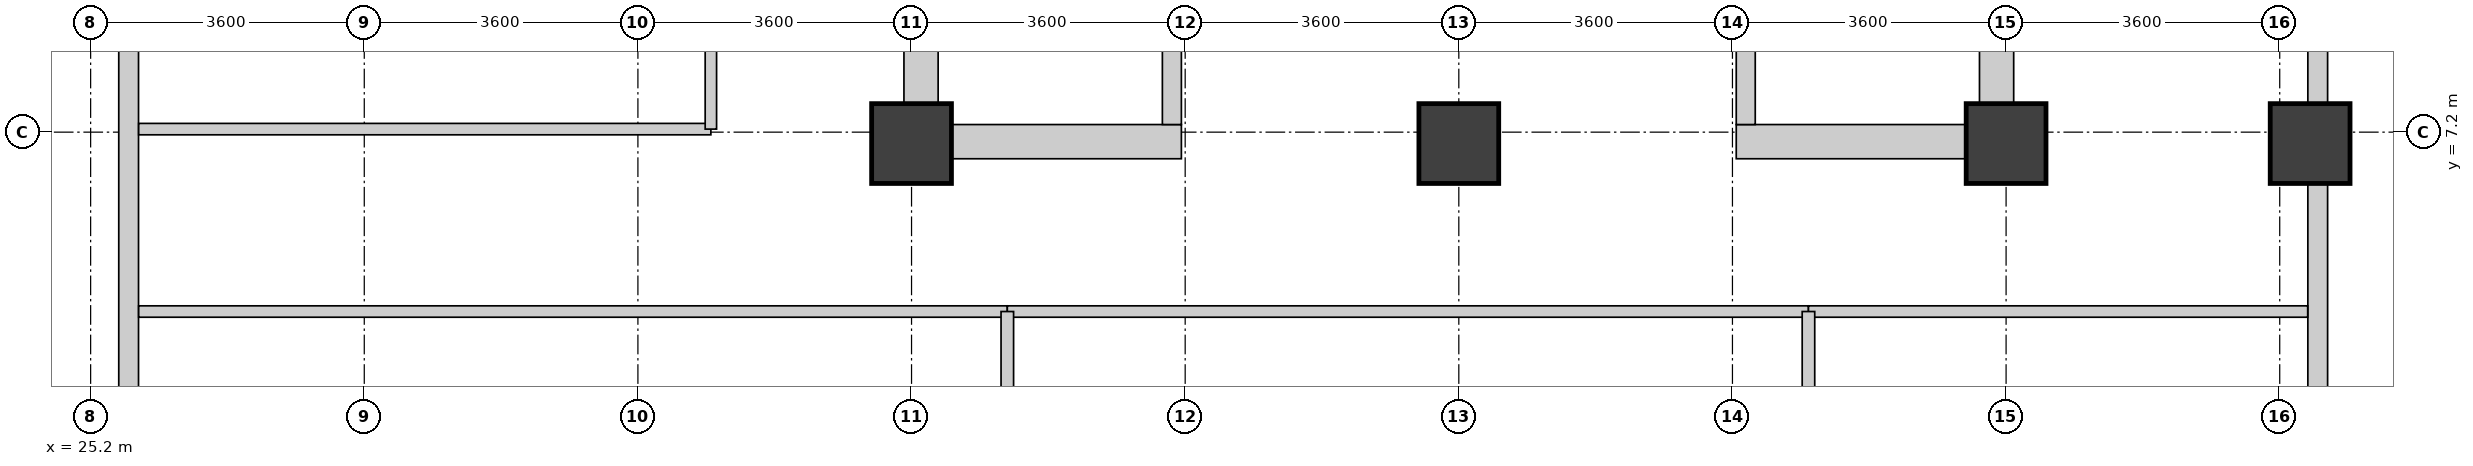
"""IFC4 building model, lengths in metres.
Left out: names, types, materials, properties, quantities, classifications, styles, units other than length and angle.
Written with IfcOpenShell. Run it as: python <this file> out.ifc"""

import sys

from ifc_helpers import new_model, si_unit, direction, frame, frame_2d, origin, origin_2d, place, context, subcontext, project, spatial, rectangle, extrude, source, transform, mapped, element, fill, save


model = new_model("IFC4")
c1 = context("Model", 3, precision=1e-05, world=origin(), true_north=direction((0.0, 1.0)))
c2 = subcontext(c1, "Body", "Model", "MODEL_VIEW")
j1 = project(units=[si_unit("LENGTHUNIT", "METRE"), si_unit("PLANEANGLEUNIT", "RADIAN")], contexts=[c1])
p1 = place(None, origin())
s1 = spatial("IfcSite", under=j1, at=p1, CompositionType="ELEMENT")
p2 = place(p1, origin())
s2 = spatial("IfcBuilding", under=s1, at=p2, CompositionType="ELEMENT")
p3 = place(p2, frame((0.0, 0.0, 135.6)))
s3 = spatial("IfcBuildingStorey", under=s2, at=p3, CompositionType="ELEMENT", Elevation=135.6)
for number, where, z_axis, x_axis in (
    (1, (36.125, 6.85, 0.0), (0.0, 0.0, 1.0), (0.0, 1.0, 0.0)),
    (2, (50.275, 6.85, 0.0), (0.0, 0.0, 1.0), (0.0, 1.0, 0.0)),
):
    element("IfcWall", number, at=place(p3, frame(where, z_axis=z_axis, x_axis=x_axis)), inside=s3, PredefinedType="SHEAR", context=c2, shape_type="SweptSolid", body=[
        extrude(rectangle(XDim=7.9, YDim=0.45, at=frame_2d((3.95, 0.0))), origin(), (0.0, 0.0, 1.0), 4.36),
    ])
for number, where, z_axis, x_axis in (
    (3, (36.35, 7.075, 0.0), (0.0, 0.0, 1.0), (1.0, 0.0, 0.0)),
    (4, (46.85, 7.075, 0.0), (0.0, 0.0, 1.0), (1.0, 0.0, 0.0)),
):
    element("IfcWall", number, at=place(p3, frame(where, z_axis=z_axis, x_axis=x_axis)), inside=s3, PredefinedType="SHEAR", context=c2, shape_type="SweptSolid", body=[
        extrude(rectangle(XDim=3.2, YDim=0.45, at=frame_2d((1.6, 0.0))), origin(), (0.0, 0.0, 1.0), 4.36),
    ])
p4 = place(p3, frame((39.425, 7.3, 0.0), z_axis=(0.0, 0.0, 1.0), x_axis=(0.0, 1.0, 0.0)))
e5 = element("IfcWall", 5, at=p4, inside=s3, PredefinedType="SHEAR", context=c2, shape_type="SweptSolid", body=[
    extrude(rectangle(XDim=7.0, YDim=0.25, at=frame_2d((3.5, 0.0))), origin(), (0.0, 0.0, 1.0), 4.36),
])
p5 = place(p4, frame((0.15, 0.0, 0.0)))
e6 = element("IfcOpeningElement", 6, at=p5, cuts=e5, PredefinedType="OPENING", context=c2, shape_type="SweptSolid", body=[
    extrude(rectangle(XDim=1.1, YDim=2.08, at=frame_2d((0.55, 1.04))), frame((0.0, 0.135, 0.0), z_axis=(0.0, -1.0, 0.0), x_axis=(1.0, 0.0, 0.0)), (0.0, 0.0, 1.0), 0.27),
])
p6 = place(p3, frame((46.975, 7.3, 0.0), z_axis=(0.0, 0.0, 1.0), x_axis=(0.0, 1.0, 0.0)))
e7 = element("IfcWall", 7, at=p6, inside=s3, PredefinedType="SHEAR", context=c2, shape_type="SweptSolid", body=[
    extrude(rectangle(XDim=7.0, YDim=0.25, at=frame_2d((3.5, 0.0))), origin(), (0.0, 0.0, 1.0), 4.36),
])
p7 = place(p6, frame((0.15, 0.0, 0.0)))
e8 = element("IfcOpeningElement", 8, at=p7, cuts=e7, PredefinedType="OPENING", context=c2, shape_type="SweptSolid", body=[
    extrude(rectangle(XDim=1.1, YDim=2.08, at=frame_2d((0.55, 1.04))), frame((0.0, 0.135, 0.0), z_axis=(0.0, -1.0, 0.0), x_axis=(1.0, 0.0, 0.0)), (0.0, 0.0, 1.0), 0.27),
])
m1 = source(origin(), c2, "Body", "SweptSolid", [
    extrude(rectangle(XDim=1.05, YDim=1.05, at=origin_2d()), origin(), (0.0, 0.0, 1.0), 4.6),
])
for number, where, z_axis, x_axis in (
    (9, (36.0, 7.05, 0.0), (0.0, 0.0, 1.0), (1.0, 0.0, 0.0)),
    (10, (43.2, 7.05, 0.0), (0.0, 0.0, 1.0), (1.0, 0.0, 0.0)),
    (11, (50.4, 7.05, 0.0), (0.0, 0.0, 1.0), (1.0, 0.0, 0.0)),
    (12, (54.4, 7.05, 0.0), (0.0, 0.0, 1.0), (1.0, 0.0, 0.0)),
):
    element("IfcColumn", number, at=place(p3, frame(where, z_axis=z_axis, x_axis=x_axis)), inside=s3, PredefinedType="COLUMN", context=c2, shape_type="MappedRepresentation", body=[
        mapped(m1, transform((0.0, 0.0, 0.0), x_axis=(1.0, 0.0, 0.0), y_axis=(0.0, 1.0, 0.0), z_axis=(0.0, 0.0, 1.0), scale=1.0)),
    ])
p8 = place(p3, frame((54.5, 6.524, 0.0), z_axis=(0.0, 0.0, 1.0), x_axis=(0.0, -1.0, 0.0)))
e13 = element("IfcWall", 13, at=p8, inside=s3, PredefinedType="STANDARD", context=c2, shape_type="SweptSolid", body=[
    extrude(rectangle(XDim=4.854, YDim=0.26, at=frame_2d((2.427, 0.0))), origin(), (0.0, 0.0, 1.0), 4.34),
])
p9 = place(p8, frame((1.952, 0.0, 0.85)))
e14 = element("IfcOpeningElement", 14, at=p9, cuts=e13, PredefinedType="OPENING", context=c2, shape_type="SweptSolid", body=[
    extrude(rectangle(XDim=0.95, YDim=1.75, at=frame_2d((0.475, 0.875))), frame((0.0, 0.14, 0.0), z_axis=(0.0, -1.0, 0.0), x_axis=(1.0, 0.0, 0.0)), (0.0, 0.0, 1.0), 0.28),
])
p10 = place(p3, frame((54.5, 14.024, 0.0), z_axis=(0.0, 0.0, 1.0), x_axis=(0.0, -1.0, 0.0)))
e15 = element("IfcWall", 15, at=p10, inside=s3, PredefinedType="STANDARD", context=c2, shape_type="SweptSolid", body=[
    extrude(rectangle(XDim=6.448, YDim=0.26, at=frame_2d((3.224, 0.0))), origin(), (0.0, 0.0, 1.0), 3.89),
])
p11 = place(p10, frame((2.749, 0.0, 0.85)))
e16 = element("IfcOpeningElement", 16, at=p11, cuts=e15, PredefinedType="OPENING", context=c2, shape_type="SweptSolid", body=[
    extrude(rectangle(XDim=0.95, YDim=1.75, at=frame_2d((0.475, 0.875))), frame((0.0, 0.14, 0.0), z_axis=(0.0, -1.0, 0.0), x_axis=(1.0, 0.0, 0.0)), (0.0, 0.0, 1.0), 0.28),
])
p12 = place(p10, frame((1.15, 0.0, 0.85)))
e17 = element("IfcOpeningElement", 17, at=p12, cuts=e15, PredefinedType="OPENING", context=c2, shape_type="SweptSolid", body=[
    extrude(rectangle(XDim=0.95, YDim=1.75, at=frame_2d((0.475, 0.875))), frame((0.0, 0.14, 0.0), z_axis=(0.0, -1.0, 0.0), x_axis=(1.0, 0.0, 0.0)), (0.0, 0.0, 1.0), 0.28),
])
p13 = place(p3, frame((25.7, 1.67, 0.0), z_axis=(0.0, 0.0, 1.0), x_axis=(0.0, 1.0, 0.0)))
e18 = element("IfcWall", 18, at=p13, inside=s3, PredefinedType="STANDARD", context=c2, shape_type="SweptSolid", body=[
    extrude(rectangle(XDim=20.06, YDim=0.26, at=frame_2d((10.03, 0.0))), origin(), (0.0, 0.0, 1.0), 4.34),
])
p14 = place(p13, frame((7.008, 0.0, 0.85)))
e19 = element("IfcOpeningElement", 19, at=p14, cuts=e18, PredefinedType="OPENING", context=c2, shape_type="SweptSolid", body=[
    extrude(rectangle(XDim=2.7, YDim=2.05, at=frame_2d((1.35, 1.025))), frame((0.0, 0.14, 0.0), z_axis=(0.0, -1.0, 0.0), x_axis=(1.0, 0.0, 0.0)), (0.0, 0.0, 1.0), 0.28),
])
p15 = place(p13, frame((13.695, 0.0, 0.85)))
e20 = element("IfcOpeningElement", 20, at=p15, cuts=e18, PredefinedType="OPENING", context=c2, shape_type="SweptSolid", body=[
    extrude(rectangle(XDim=2.7, YDim=2.05, at=frame_2d((1.35, 1.025))), frame((0.0, 0.14, 0.0), z_axis=(0.0, -1.0, 0.0), x_axis=(1.0, 0.0, 0.0)), (0.0, 0.0, 1.0), 0.28),
])
p16 = place(p3, frame((25.832, 4.84, 0.0), z_axis=(0.0, 0.0, 1.0), x_axis=(1.0, 0.0, 0.0)))
e21 = element("IfcWall", 21, at=p16, inside=s3, PredefinedType="PARTITIONING", context=c2, shape_type="SweptSolid", body=[
    extrude(rectangle(XDim=11.428, YDim=0.15, at=frame_2d((5.714, 0.0))), origin(), (0.0, 0.0, 1.0), 4.34),
])
p17 = place(p16, frame((5.064, 0.0, 0.0)))
e22 = element("IfcOpeningElement", 22, at=p17, cuts=e21, PredefinedType="OPENING", context=c2, shape_type="SweptSolid", body=[
    extrude(rectangle(XDim=1.3, YDim=2.12, at=frame_2d((0.65, 1.06))), frame((0.0, 0.085, 0.0), z_axis=(0.0, -1.0, 0.0), x_axis=(1.0, 0.0, 0.0)), (0.0, 0.0, 1.0), 0.17),
])
p18 = place(p3, frame((37.26, 4.84, 0.0), z_axis=(0.0, 0.0, 1.0), x_axis=(1.0, 0.0, 0.0)))
e23 = element("IfcWall", 23, at=p18, inside=s3, PredefinedType="PARTITIONING", context=c2, shape_type="SweptSolid", body=[
    extrude(rectangle(XDim=10.54, YDim=0.15, at=frame_2d((5.27, 0.0))), origin(), (0.0, 0.0, 1.0), 4.34),
])
p19 = place(p18, frame((4.82, 0.0, 0.0)))
e24 = element("IfcOpeningElement", 24, at=p19, cuts=e23, PredefinedType="OPENING", context=c2, shape_type="SweptSolid", body=[
    extrude(rectangle(XDim=0.9, YDim=2.08, at=frame_2d((0.45, 1.04))), frame((0.0, 0.085, 0.0), z_axis=(0.0, -1.0, 0.0), x_axis=(1.0, 0.0, 0.0)), (0.0, 0.0, 1.0), 0.17),
])
p20 = place(p3, frame((25.832, 7.24, 0.0), z_axis=(0.0, 0.0, 1.0), x_axis=(1.0, 0.0, 0.0)))
e25 = element("IfcWall", 25, at=p20, inside=s3, PredefinedType="PARTITIONING", context=c2, shape_type="SweptSolid", body=[
    extrude(rectangle(XDim=7.528, YDim=0.15, at=frame_2d((3.764, 0.0))), origin(), (0.0, 0.0, 1.0), 4.34),
])
p21 = place(p20, frame((3.114, 0.0, 0.0)))
e26 = element("IfcOpeningElement", 26, at=p21, cuts=e25, PredefinedType="OPENING", context=c2, shape_type="SweptSolid", body=[
    extrude(rectangle(XDim=1.3, YDim=2.12, at=frame_2d((0.65, 1.06))), frame((0.0, 0.085, 0.0), z_axis=(0.0, -1.0, 0.0), x_axis=(1.0, 0.0, 0.0)), (0.0, 0.0, 1.0), 0.17),
])
p22 = place(p3, frame((33.36, 7.24, 0.0), z_axis=(0.0, 0.0, 1.0), x_axis=(0.0, 1.0, 0.0)))
e27 = element("IfcWall", 27, at=p22, inside=s3, PredefinedType="PARTITIONING", context=c2, shape_type="SweptSolid", body=[
    extrude(rectangle(XDim=7.26, YDim=0.15, at=frame_2d((3.63, 0.0))), origin(), (0.0, 0.0, 1.0), 4.34),
])
p23 = place(p3, frame((47.8, 4.84, 0.0), z_axis=(0.0, 0.0, 1.0), x_axis=(1.0, 0.0, 0.0)))
e28 = element("IfcWall", 28, at=p23, inside=s3, PredefinedType="PARTITIONING", context=c2, shape_type="SweptSolid", body=[
    extrude(rectangle(XDim=6.568, YDim=0.15, at=frame_2d((3.284, 0.0))), origin(), (0.0, 0.0, 1.0), 4.34),
])
p24 = place(p23, frame((2.634, 0.0, 0.0)))
e29 = element("IfcOpeningElement", 29, at=p24, cuts=e28, PredefinedType="OPENING", context=c2, shape_type="SweptSolid", body=[
    extrude(rectangle(XDim=1.3, YDim=2.12, at=frame_2d((0.65, 1.06))), frame((0.0, 0.085, 0.0), z_axis=(0.0, -1.0, 0.0), x_axis=(1.0, 0.0, 0.0)), (0.0, 0.0, 1.0), 0.17),
])
for number, where, z_axis, x_axis in (
    (30, (37.26, 1.932, 0.0), (0.0, 0.0, 1.0), (0.0, 1.0, 0.0)),
    (31, (47.8, 1.932, 0.0), (0.0, 0.0, 1.0), (0.0, 1.0, 0.0)),
):
    element("IfcWall", number, at=place(p3, frame(where, z_axis=z_axis, x_axis=x_axis)), inside=s3, PredefinedType="PARTITIONING", context=c2, shape_type="SweptSolid", body=[
        extrude(rectangle(XDim=2.908, YDim=0.165, at=frame_2d((1.454, 0.0))), origin(), (0.0, 0.0, 1.0), 4.34),
    ])
p25 = place(p9, origin())
e32 = element("IfcWindow", 32, at=p25, inside=s3, PartitioningType="SINGLE_PANEL", PredefinedType="WINDOW", context=c2, shape_type="SweptSolid", body=[
    extrude(rectangle(XDim=0.95, YDim=1.75, at=frame_2d((0.475, 0.875))), frame((0.0, 0.03, 0.0), z_axis=(0.0, -1.0, 0.0), x_axis=(1.0, 0.0, 0.0)), (0.0, 0.0, 1.0), 0.06),
])
fill(e14, e32)
p26 = place(p5, origin())
e33 = element("IfcDoor", 33, at=p26, inside=s3, OperationType="SINGLE_SWING_RIGHT", PredefinedType="DOOR", context=c2, shape_type="SweptSolid", body=[
    extrude(rectangle(XDim=1.1, YDim=2.08, at=frame_2d((0.55, 1.04))), frame((0.0, 0.025, 0.0), z_axis=(0.0, -1.0, 0.0), x_axis=(1.0, 0.0, 0.0)), (0.0, 0.0, 1.0), 0.05),
])
fill(e6, e33)
p27 = place(p7, origin())
e34 = element("IfcDoor", 34, at=p27, inside=s3, OperationType="SINGLE_SWING_LEFT", PredefinedType="DOOR", context=c2, shape_type="SweptSolid", body=[
    extrude(rectangle(XDim=1.1, YDim=2.08, at=frame_2d((0.55, 1.04))), frame((0.0, 0.025, 0.0), z_axis=(0.0, -1.0, 0.0), x_axis=(1.0, 0.0, 0.0)), (0.0, 0.0, 1.0), 0.05),
])
fill(e8, e34)
p28 = place(p17, origin())
e35 = element("IfcDoor", 35, at=p28, inside=s3, OperationType="DOUBLE_DOOR_SINGLE_SWING", PredefinedType="DOOR", context=c2, shape_type="SweptSolid", body=[
    extrude(rectangle(XDim=1.3, YDim=2.12, at=frame_2d((0.65, 1.06))), frame((0.0, 0.025, 0.0), z_axis=(0.0, -1.0, 0.0), x_axis=(1.0, 0.0, 0.0)), (0.0, 0.0, 1.0), 0.05),
])
fill(e22, e35)
p29 = place(p19, origin())
e36 = element("IfcDoor", 36, at=p29, inside=s3, OperationType="SINGLE_SWING_LEFT", PredefinedType="DOOR", context=c2, shape_type="SweptSolid", body=[
    extrude(rectangle(XDim=0.9, YDim=2.08, at=frame_2d((0.45, 1.04))), frame((0.0, 0.025, 0.0), z_axis=(0.0, -1.0, 0.0), x_axis=(1.0, 0.0, 0.0)), (0.0, 0.0, 1.0), 0.05),
])
fill(e24, e36)
p30 = place(p21, origin())
e37 = element("IfcDoor", 37, at=p30, inside=s3, OperationType="DOUBLE_DOOR_SINGLE_SWING", PredefinedType="DOOR", context=c2, shape_type="SweptSolid", body=[
    extrude(rectangle(XDim=1.3, YDim=2.12, at=frame_2d((0.65, 1.06))), frame((0.0, 0.025, 0.0), z_axis=(0.0, -1.0, 0.0), x_axis=(1.0, 0.0, 0.0)), (0.0, 0.0, 1.0), 0.05),
])
fill(e26, e37)
p31 = place(p24, origin())
e38 = element("IfcDoor", 38, at=p31, inside=s3, OperationType="DOUBLE_DOOR_SINGLE_SWING", PredefinedType="DOOR", context=c2, shape_type="SweptSolid", body=[
    extrude(rectangle(XDim=1.3, YDim=2.12, at=frame_2d((0.65, 1.06))), frame((0.0, 0.025, 0.0), z_axis=(0.0, -1.0, 0.0), x_axis=(1.0, 0.0, 0.0)), (0.0, 0.0, 1.0), 0.05),
])
fill(e29, e38)
save(model, sys.argv[1])
